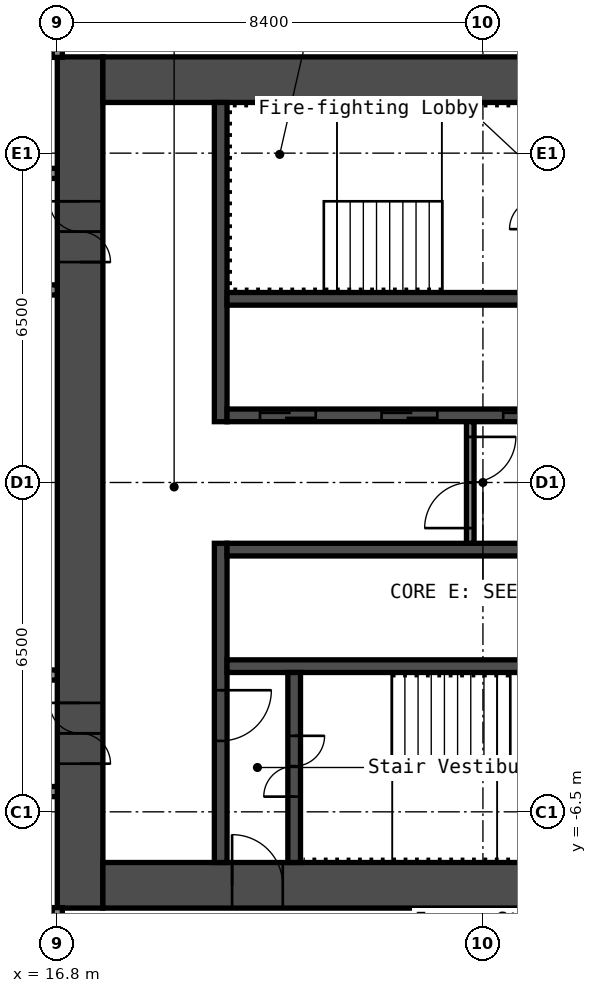
"""IFC4 building model, lengths in metres.
Left out: names, types, materials, properties, quantities, classifications, styles, units other than length and angle.
Written with IfcOpenShell. Run it as: python <this file> out.ifc"""

import sys

from ifc_helpers import new_model, si_unit, direction, frame, frame_2d, origin, place, context, subcontext, project, spatial, rectangle, extrude, element, fill, save


model = new_model("IFC4")
c1 = context("Model", 3, precision=1e-05, world=origin(), true_north=direction((0.0, 1.0)))
c2 = subcontext(c1, "Body", "Model", "MODEL_VIEW")
j1 = project(units=[si_unit("LENGTHUNIT", "METRE"), si_unit("PLANEANGLEUNIT", "RADIAN")], contexts=[c1])
p1 = place(None, origin())
s1 = spatial("IfcSite", under=j1, at=p1, CompositionType="ELEMENT")
p2 = place(p1, origin())
s2 = spatial("IfcBuilding", under=s1, at=p2, CompositionType="ELEMENT")
p3 = place(p2, frame((0.0, 0.0, 42.2)))
s3 = spatial("IfcBuildingStorey", under=s2, at=p3, CompositionType="ELEMENT", Elevation=42.2)
p4 = place(p3, frame((17.25, -8.4, 0.0), z_axis=(0.0, 0.0, 1.0), x_axis=(0.0, 1.0, 0.0)))
e1 = element("IfcWall", 1, at=p4, inside=s3, PredefinedType="SHEAR", context=c2, shape_type="SweptSolid", body=[
    extrude(rectangle(XDim=16.8, YDim=0.9, at=frame_2d((8.4, 0.0))), origin(), (0.0, 0.0, 1.0), 2.8),
])
p5 = place(p4, frame((12.75, 0.0, 0.0)))
e2 = element("IfcOpeningElement", 2, at=p5, cuts=e1, PredefinedType="OPENING", context=c2, shape_type="SweptSolid", body=[
    extrude(rectangle(XDim=1.2, YDim=2.1, at=frame_2d((0.6, 1.05))), frame((0.0, 0.46, 0.0), z_axis=(0.0, -1.0, 0.0), x_axis=(1.0, 0.0, 0.0)), (0.0, 0.0, 1.0), 0.92),
])
p6 = place(p4, frame((2.85, 0.0, 0.0)))
e3 = element("IfcOpeningElement", 3, at=p6, cuts=e1, PredefinedType="OPENING", context=c2, shape_type="SweptSolid", body=[
    extrude(rectangle(XDim=1.2, YDim=2.1, at=frame_2d((0.6, 1.05))), frame((0.0, 0.46, 0.0), z_axis=(0.0, -1.0, 0.0), x_axis=(1.0, 0.0, 0.0)), (0.0, 0.0, 1.0), 0.92),
])
p7 = place(p3, frame((17.7, 7.95, 0.0), z_axis=(0.0, 0.0, 1.0), x_axis=(1.0, 0.0, 0.0)))
e4 = element("IfcWall", 4, at=p7, inside=s3, PredefinedType="SHEAR", context=c2, shape_type="SweptSolid", body=[
    extrude(rectangle(XDim=15.0, YDim=0.9, at=frame_2d((7.5, 0.0))), origin(), (0.0, 0.0, 1.0), 2.8),
])
p8 = place(p7, frame((10.4, 0.0, 0.0)))
e5 = element("IfcOpeningElement", 5, at=p8, cuts=e4, PredefinedType="OPENING", context=c2, shape_type="SweptSolid", body=[
    extrude(rectangle(XDim=1.2, YDim=2.1, at=frame_2d((0.6, 1.05))), frame((0.0, 0.46, 0.0), z_axis=(0.0, -1.0, 0.0), x_axis=(1.0, 0.0, 0.0)), (0.0, 0.0, 1.0), 0.92),
])
p9 = place(p7, frame((13.35, 0.0, 0.0)))
e6 = element("IfcOpeningElement", 6, at=p9, cuts=e4, PredefinedType="OPENING", context=c2, shape_type="SweptSolid", body=[
    extrude(rectangle(XDim=0.9, YDim=2.1, at=frame_2d((0.45, 1.05))), frame((0.0, 0.46, 0.0), z_axis=(0.0, -1.0, 0.0), x_axis=(1.0, 0.0, 0.0)), (0.0, 0.0, 1.0), 0.92),
])
p10 = place(p3, frame((17.7, -7.95, 0.0), z_axis=(0.0, 0.0, 1.0), x_axis=(1.0, 0.0, 0.0)))
e7 = element("IfcWall", 7, at=p10, inside=s3, PredefinedType="SHEAR", context=c2, shape_type="SweptSolid", body=[
    extrude(rectangle(XDim=15.0, YDim=0.9, at=frame_2d((7.5, 0.0))), origin(), (0.0, 0.0, 1.0), 2.8),
])
p11 = place(p10, frame((2.55, 0.0, 0.0)))
e8 = element("IfcOpeningElement", 8, at=p11, cuts=e7, PredefinedType="OPENING", context=c2, shape_type="SweptSolid", body=[
    extrude(rectangle(XDim=1.0, YDim=2.1, at=frame_2d((0.5, 1.05))), frame((0.0, 0.46, 0.0), z_axis=(0.0, -1.0, 0.0), x_axis=(1.0, 0.0, 0.0)), (0.0, 0.0, 1.0), 0.92),
])
p12 = place(p3, frame((20.025, 1.2, 0.0), z_axis=(0.0, 0.0, 1.0), x_axis=(0.0, 1.0, 0.0)))
e9 = element("IfcWall", 9, at=p12, inside=s3, PredefinedType="SHEAR", context=c2, shape_type="SweptSolid", body=[
    extrude(rectangle(XDim=6.3, YDim=0.25, at=frame_2d((3.15, 0.0))), origin(), (0.0, 0.0, 1.0), 2.8),
])
p13 = place(p3, frame((20.025, -7.5, 0.0), z_axis=(0.0, 0.0, 1.0), x_axis=(0.0, 1.0, 0.0)))
e10 = element("IfcWall", 10, at=p13, inside=s3, PredefinedType="SHEAR", context=c2, shape_type="SweptSolid", body=[
    extrude(rectangle(XDim=6.3, YDim=0.25, at=frame_2d((3.15, 0.0))), origin(), (0.0, 0.0, 1.0), 2.8),
])
p14 = place(p13, frame((2.4, 0.0, 0.0)))
e11 = element("IfcOpeningElement", 11, at=p14, cuts=e10, PredefinedType="OPENING", context=c2, shape_type="SweptSolid", body=[
    extrude(rectangle(XDim=1.0, YDim=2.1, at=frame_2d((0.5, 1.05))), frame((0.0, 0.135, 0.0), z_axis=(0.0, -1.0, 0.0), x_axis=(1.0, 0.0, 0.0)), (0.0, 0.0, 1.0), 0.27),
])
p15 = place(p3, frame((20.15, 1.325, 0.0), z_axis=(0.0, 0.0, 1.0), x_axis=(1.0, 0.0, 0.0)))
e12 = element("IfcWall", 12, at=p15, inside=s3, PredefinedType="SHEAR", context=c2, shape_type="SweptSolid", body=[
    extrude(rectangle(XDim=7.5, YDim=0.25, at=frame_2d((3.75, 0.0))), origin(), (0.0, 0.0, 1.0), 2.8),
])
p16 = place(p15, frame((0.65, 0.0, 0.0)))
e13 = element("IfcOpeningElement", 13, at=p16, cuts=e12, PredefinedType="OPENING", context=c2, shape_type="SweptSolid", body=[
    extrude(rectangle(XDim=1.1, YDim=2.1, at=frame_2d((0.55, 1.05))), frame((0.0, 0.135, 0.0), z_axis=(0.0, -1.0, 0.0), x_axis=(1.0, 0.0, 0.0)), (0.0, 0.0, 1.0), 0.27),
])
p17 = place(p15, frame((3.05, 0.0, 0.0)))
e14 = element("IfcOpeningElement", 14, at=p17, cuts=e12, PredefinedType="OPENING", context=c2, shape_type="SweptSolid", body=[
    extrude(rectangle(XDim=1.1, YDim=2.1, at=frame_2d((0.55, 1.05))), frame((0.0, 0.135, 0.0), z_axis=(0.0, -1.0, 0.0), x_axis=(1.0, 0.0, 0.0)), (0.0, 0.0, 1.0), 0.27),
])
p18 = place(p15, frame((5.45, 0.0, 0.0)))
e15 = element("IfcOpeningElement", 15, at=p18, cuts=e12, PredefinedType="OPENING", context=c2, shape_type="SweptSolid", body=[
    extrude(rectangle(XDim=1.1, YDim=2.1, at=frame_2d((0.55, 1.05))), frame((0.0, 0.135, 0.0), z_axis=(0.0, -1.0, 0.0), x_axis=(1.0, 0.0, 0.0)), (0.0, 0.0, 1.0), 0.27),
])
for number, where, z_axis, x_axis in (
    (16, (20.15, 3.625, 0.0), (0.0, 0.0, 1.0), (1.0, 0.0, 0.0)),
    (17, (20.15, -1.325, 0.0), (0.0, 0.0, 1.0), (1.0, 0.0, 0.0)),
    (18, (20.15, -3.625, 0.0), (0.0, 0.0, 1.0), (1.0, 0.0, 0.0)),
):
    element("IfcWall", number, at=place(p3, frame(where, z_axis=z_axis, x_axis=x_axis)), inside=s3, PredefinedType="SHEAR", context=c2, shape_type="SweptSolid", body=[
        extrude(rectangle(XDim=7.5, YDim=0.25, at=frame_2d((3.75, 0.0))), origin(), (0.0, 0.0, 1.0), 2.8),
    ])
p19 = place(p3, frame((21.475, -7.5, 0.0), z_axis=(0.0, 0.0, 1.0), x_axis=(0.0, 1.0, 0.0)))
e19 = element("IfcWall", 19, at=p19, inside=s3, PredefinedType="SHEAR", context=c2, shape_type="SweptSolid", body=[
    extrude(rectangle(XDim=3.75, YDim=0.25, at=frame_2d((1.875, 0.0))), origin(), (0.0, 0.0, 1.0), 2.8),
])
p20 = place(p19, frame((1.3, 0.0, 0.0)))
e20 = element("IfcOpeningElement", 20, at=p20, cuts=e19, PredefinedType="OPENING", context=c2, shape_type="SweptSolid", body=[
    extrude(rectangle(XDim=1.2, YDim=2.1, at=frame_2d((0.6, 1.05))), frame((0.0, 0.135, 0.0), z_axis=(0.0, -1.0, 0.0), x_axis=(1.0, 0.0, 0.0)), (0.0, 0.0, 1.0), 0.27),
])
p21 = place(p3, frame((24.95, -1.2, 0.0), z_axis=(0.0, 0.0, 1.0), x_axis=(0.0, 1.0, 0.0)))
e21 = element("IfcWall", 21, at=p21, inside=s3, PredefinedType="PARTITIONING", context=c2, shape_type="SweptSolid", body=[
    extrude(rectangle(XDim=2.4, YDim=0.15, at=frame_2d((1.2, 0.0))), origin(), (0.0, 0.0, 1.0), 2.8),
])
p22 = place(p21, frame((0.3, 0.0, 0.0)))
e22 = element("IfcOpeningElement", 22, at=p22, cuts=e21, PredefinedType="OPENING", context=c2, shape_type="SweptSolid", body=[
    extrude(rectangle(XDim=1.8, YDim=2.1, at=frame_2d((0.9, 1.05))), frame((0.0, 0.085, 0.0), z_axis=(0.0, -1.0, 0.0), x_axis=(1.0, 0.0, 0.0)), (0.0, 0.0, 1.0), 0.17),
])
p23 = place(p3, frame((-16.8, -6.1, 0.0), z_axis=(0.0, 0.0, 1.0), x_axis=(1.0, 0.0, 0.0)))
e23 = element("IfcWall", 23, at=p23, inside=s3, PredefinedType="PARTITIONING", context=c2, shape_type="SweptSolid", body=[
    extrude(rectangle(XDim=33.6, YDim=0.2, at=frame_2d((16.8, 0.0))), origin(), (0.0, 0.0, 1.0), 2.8),
])
p24 = place(p23, frame((5.4, 0.0, 0.0)))
e24 = element("IfcOpeningElement", 24, at=p24, cuts=e23, PredefinedType="OPENING", context=c2, shape_type="SweptSolid", body=[
    extrude(rectangle(XDim=1.0, YDim=2.1, at=frame_2d((0.5, 1.05))), frame((0.0, 0.11, 0.0), z_axis=(0.0, -1.0, 0.0), x_axis=(1.0, 0.0, 0.0)), (0.0, 0.0, 1.0), 0.22),
])
p25 = place(p23, frame((11.25, 0.0, 0.0)))
e25 = element("IfcOpeningElement", 25, at=p25, cuts=e23, PredefinedType="OPENING", context=c2, shape_type="SweptSolid", body=[
    extrude(rectangle(XDim=1.0, YDim=2.1, at=frame_2d((0.5, 1.05))), frame((0.0, 0.11, 0.0), z_axis=(0.0, -1.0, 0.0), x_axis=(1.0, 0.0, 0.0)), (0.0, 0.0, 1.0), 0.22),
])
p26 = place(p23, frame((12.95, 0.0, 0.0)))
e26 = element("IfcOpeningElement", 26, at=p26, cuts=e23, PredefinedType="OPENING", context=c2, shape_type="SweptSolid", body=[
    extrude(rectangle(XDim=1.0, YDim=2.1, at=frame_2d((0.5, 1.05))), frame((0.0, 0.11, 0.0), z_axis=(0.0, -1.0, 0.0), x_axis=(1.0, 0.0, 0.0)), (0.0, 0.0, 1.0), 0.22),
])
p27 = place(p23, frame((18.115, 0.0, 0.0)))
e27 = element("IfcOpeningElement", 27, at=p27, cuts=e23, PredefinedType="OPENING", context=c2, shape_type="SweptSolid", body=[
    extrude(rectangle(XDim=0.9, YDim=2.1, at=frame_2d((0.45, 1.05))), frame((0.0, 0.11, 0.0), z_axis=(0.0, -1.0, 0.0), x_axis=(1.0, 0.0, 0.0)), (0.0, 0.0, 1.0), 0.22),
])
p28 = place(p23, frame((22.315, 0.0, 0.0)))
e28 = element("IfcOpeningElement", 28, at=p28, cuts=e23, PredefinedType="OPENING", context=c2, shape_type="SweptSolid", body=[
    extrude(rectangle(XDim=0.9, YDim=2.1, at=frame_2d((0.45, 1.05))), frame((0.0, 0.11, 0.0), z_axis=(0.0, -1.0, 0.0), x_axis=(1.0, 0.0, 0.0)), (0.0, 0.0, 1.0), 0.22),
])
p29 = place(p23, frame((28.05, 0.0, 0.0)))
e29 = element("IfcOpeningElement", 29, at=p29, cuts=e23, PredefinedType="OPENING", context=c2, shape_type="SweptSolid", body=[
    extrude(rectangle(XDim=1.0, YDim=2.1, at=frame_2d((0.5, 1.05))), frame((0.0, 0.11, 0.0), z_axis=(0.0, -1.0, 0.0), x_axis=(1.0, 0.0, 0.0)), (0.0, 0.0, 1.0), 0.22),
])
p30 = place(p23, frame((29.75, 0.0, 0.0)))
e30 = element("IfcOpeningElement", 30, at=p30, cuts=e23, PredefinedType="OPENING", context=c2, shape_type="SweptSolid", body=[
    extrude(rectangle(XDim=1.0, YDim=2.1, at=frame_2d((0.5, 1.05))), frame((0.0, 0.11, 0.0), z_axis=(0.0, -1.0, 0.0), x_axis=(1.0, 0.0, 0.0)), (0.0, 0.0, 1.0), 0.22),
])
p31 = place(p3, frame((-16.8, -3.8, 0.0), z_axis=(0.0, 0.0, 1.0), x_axis=(1.0, 0.0, 0.0)))
e31 = element("IfcWall", 31, at=p31, inside=s3, PredefinedType="PARTITIONING", context=c2, shape_type="SweptSolid", body=[
    extrude(rectangle(XDim=33.6, YDim=0.2, at=frame_2d((16.8, 0.0))), origin(), (0.0, 0.0, 1.0), 2.8),
])
p32 = place(p31, frame((9.46, 0.0, 0.0)))
e32 = element("IfcOpeningElement", 32, at=p32, cuts=e31, PredefinedType="OPENING", context=c2, shape_type="SweptSolid", body=[
    extrude(rectangle(XDim=0.9, YDim=2.1, at=frame_2d((0.45, 1.05))), frame((0.0, 0.11, 0.0), z_axis=(0.0, -1.0, 0.0), x_axis=(1.0, 0.0, 0.0)), (0.0, 0.0, 1.0), 0.22),
])
p33 = place(p31, frame((13.66, 0.0, 0.0)))
e33 = element("IfcOpeningElement", 33, at=p33, cuts=e31, PredefinedType="OPENING", context=c2, shape_type="SweptSolid", body=[
    extrude(rectangle(XDim=0.9, YDim=2.1, at=frame_2d((0.45, 1.05))), frame((0.0, 0.11, 0.0), z_axis=(0.0, -1.0, 0.0), x_axis=(1.0, 0.0, 0.0)), (0.0, 0.0, 1.0), 0.22),
])
p34 = place(p31, frame((26.6, 0.0, 0.0)))
e34 = element("IfcOpeningElement", 34, at=p34, cuts=e31, PredefinedType="OPENING", context=c2, shape_type="SweptSolid", body=[
    extrude(rectangle(XDim=0.9, YDim=2.1, at=frame_2d((0.45, 1.05))), frame((0.0, 0.11, 0.0), z_axis=(0.0, -1.0, 0.0), x_axis=(1.0, 0.0, 0.0)), (0.0, 0.0, 1.0), 0.22),
])
p35 = place(p31, frame((30.8, 0.0, 0.0)))
e35 = element("IfcOpeningElement", 35, at=p35, cuts=e31, PredefinedType="OPENING", context=c2, shape_type="SweptSolid", body=[
    extrude(rectangle(XDim=0.9, YDim=2.1, at=frame_2d((0.45, 1.05))), frame((0.0, 0.11, 0.0), z_axis=(0.0, -1.0, 0.0), x_axis=(1.0, 0.0, 0.0)), (0.0, 0.0, 1.0), 0.22),
])
p36 = place(p3, frame((-16.8, 3.8, 0.0), z_axis=(0.0, 0.0, 1.0), x_axis=(1.0, 0.0, 0.0)))
e36 = element("IfcWall", 36, at=p36, inside=s3, PredefinedType="PARTITIONING", context=c2, shape_type="SweptSolid", body=[
    extrude(rectangle(XDim=33.6, YDim=0.2, at=frame_2d((16.8, 0.0))), origin(), (0.0, 0.0, 1.0), 2.8),
])
p37 = place(p36, frame((2.24, 0.0, 0.0)))
e37 = element("IfcOpeningElement", 37, at=p37, cuts=e36, PredefinedType="OPENING", context=c2, shape_type="SweptSolid", body=[
    extrude(rectangle(XDim=0.9, YDim=2.1, at=frame_2d((0.45, 1.05))), frame((0.0, 0.11, 0.0), z_axis=(0.0, -1.0, 0.0), x_axis=(1.0, 0.0, 0.0)), (0.0, 0.0, 1.0), 0.22),
])
p38 = place(p36, frame((6.44, 0.0, 0.0)))
e38 = element("IfcOpeningElement", 38, at=p38, cuts=e36, PredefinedType="OPENING", context=c2, shape_type="SweptSolid", body=[
    extrude(rectangle(XDim=0.9, YDim=2.1, at=frame_2d((0.45, 1.05))), frame((0.0, 0.11, 0.0), z_axis=(0.0, -1.0, 0.0), x_axis=(1.0, 0.0, 0.0)), (0.0, 0.0, 1.0), 0.22),
])
p39 = place(p36, frame((17.945, 0.0, 0.0)))
e39 = element("IfcOpeningElement", 39, at=p39, cuts=e36, PredefinedType="OPENING", context=c2, shape_type="SweptSolid", body=[
    extrude(rectangle(XDim=0.9, YDim=2.1, at=frame_2d((0.45, 1.05))), frame((0.0, 0.11, 0.0), z_axis=(0.0, -1.0, 0.0), x_axis=(1.0, 0.0, 0.0)), (0.0, 0.0, 1.0), 0.22),
])
p40 = place(p36, frame((22.145, 0.0, 0.0)))
e40 = element("IfcOpeningElement", 40, at=p40, cuts=e36, PredefinedType="OPENING", context=c2, shape_type="SweptSolid", body=[
    extrude(rectangle(XDim=0.9, YDim=2.1, at=frame_2d((0.45, 1.05))), frame((0.0, 0.11, 0.0), z_axis=(0.0, -1.0, 0.0), x_axis=(1.0, 0.0, 0.0)), (0.0, 0.0, 1.0), 0.22),
])
p41 = place(p3, frame((-16.8, 6.1, 0.0), z_axis=(0.0, 0.0, 1.0), x_axis=(1.0, 0.0, 0.0)))
e41 = element("IfcWall", 41, at=p41, inside=s3, PredefinedType="PARTITIONING", context=c2, shape_type="SweptSolid", body=[
    extrude(rectangle(XDim=33.6, YDim=0.2, at=frame_2d((16.8, 0.0))), origin(), (0.0, 0.0, 1.0), 2.8),
])
p42 = place(p41, frame((5.4, 0.0, 0.0)))
e42 = element("IfcOpeningElement", 42, at=p42, cuts=e41, PredefinedType="OPENING", context=c2, shape_type="SweptSolid", body=[
    extrude(rectangle(XDim=1.0, YDim=2.1, at=frame_2d((0.5, 1.05))), frame((0.0, 0.11, 0.0), z_axis=(0.0, -1.0, 0.0), x_axis=(1.0, 0.0, 0.0)), (0.0, 0.0, 1.0), 0.22),
])
p43 = place(p41, frame((11.25, 0.0, 0.0)))
e43 = element("IfcOpeningElement", 43, at=p43, cuts=e41, PredefinedType="OPENING", context=c2, shape_type="SweptSolid", body=[
    extrude(rectangle(XDim=1.0, YDim=2.1, at=frame_2d((0.5, 1.05))), frame((0.0, 0.11, 0.0), z_axis=(0.0, -1.0, 0.0), x_axis=(1.0, 0.0, 0.0)), (0.0, 0.0, 1.0), 0.22),
])
p44 = place(p41, frame((12.95, 0.0, 0.0)))
e44 = element("IfcOpeningElement", 44, at=p44, cuts=e41, PredefinedType="OPENING", context=c2, shape_type="SweptSolid", body=[
    extrude(rectangle(XDim=1.0, YDim=2.1, at=frame_2d((0.5, 1.05))), frame((0.0, 0.11, 0.0), z_axis=(0.0, -1.0, 0.0), x_axis=(1.0, 0.0, 0.0)), (0.0, 0.0, 1.0), 0.22),
])
p45 = place(p41, frame((18.28, 0.0, 0.0)))
e45 = element("IfcOpeningElement", 45, at=p45, cuts=e41, PredefinedType="OPENING", context=c2, shape_type="SweptSolid", body=[
    extrude(rectangle(XDim=0.9, YDim=2.1, at=frame_2d((0.45, 1.05))), frame((0.0, 0.11, 0.0), z_axis=(0.0, -1.0, 0.0), x_axis=(1.0, 0.0, 0.0)), (0.0, 0.0, 1.0), 0.22),
])
p46 = place(p41, frame((22.48, 0.0, 0.0)))
e46 = element("IfcOpeningElement", 46, at=p46, cuts=e41, PredefinedType="OPENING", context=c2, shape_type="SweptSolid", body=[
    extrude(rectangle(XDim=0.9, YDim=2.1, at=frame_2d((0.45, 1.05))), frame((0.0, 0.11, 0.0), z_axis=(0.0, -1.0, 0.0), x_axis=(1.0, 0.0, 0.0)), (0.0, 0.0, 1.0), 0.22),
])
p47 = place(p41, frame((28.05, 0.0, 0.0)))
e47 = element("IfcOpeningElement", 47, at=p47, cuts=e41, PredefinedType="OPENING", context=c2, shape_type="SweptSolid", body=[
    extrude(rectangle(XDim=1.0, YDim=2.1, at=frame_2d((0.5, 1.05))), frame((0.0, 0.11, 0.0), z_axis=(0.0, -1.0, 0.0), x_axis=(1.0, 0.0, 0.0)), (0.0, 0.0, 1.0), 0.22),
])
p48 = place(p41, frame((29.75, 0.0, 0.0)))
e48 = element("IfcOpeningElement", 48, at=p48, cuts=e41, PredefinedType="OPENING", context=c2, shape_type="SweptSolid", body=[
    extrude(rectangle(XDim=1.0, YDim=2.1, at=frame_2d((0.5, 1.05))), frame((0.0, 0.11, 0.0), z_axis=(0.0, -1.0, 0.0), x_axis=(1.0, 0.0, 0.0)), (0.0, 0.0, 1.0), 0.22),
])
for number, where, z_axis, x_axis in (
    (49, (16.8, -20.3, 0.0), (0.0, 0.0, 1.0), (0.0, 1.0, 0.0)),
    (50, (16.8, 8.39, 0.0), (0.0, 0.0, 1.0), (0.0, 1.0, 0.0)),
):
    element("IfcWall", number, at=place(p3, frame(where, z_axis=z_axis, x_axis=x_axis)), inside=s3, PredefinedType="PARTITIONING", context=c2, shape_type="SweptSolid", body=[
        extrude(rectangle(XDim=11.91, YDim=0.2, at=frame_2d((5.955, 0.0))), origin(), (0.0, 0.0, 1.0), 2.8),
    ])
p49 = place(p5, origin())
e51 = element("IfcDoor", 51, at=p49, inside=s3, OperationType="DOUBLE_DOOR_SINGLE_SWING", PredefinedType="DOOR", context=c2, shape_type="SweptSolid", body=[
    extrude(rectangle(XDim=1.2, YDim=2.1, at=frame_2d((0.6, 1.05))), frame((0.0, 0.025, 0.0), z_axis=(0.0, -1.0, 0.0), x_axis=(1.0, 0.0, 0.0)), (0.0, 0.0, 1.0), 0.05),
])
fill(e2, e51)
p50 = place(p6, origin())
e52 = element("IfcDoor", 52, at=p50, inside=s3, OperationType="DOUBLE_DOOR_SINGLE_SWING", PredefinedType="DOOR", context=c2, shape_type="SweptSolid", body=[
    extrude(rectangle(XDim=1.2, YDim=2.1, at=frame_2d((0.6, 1.05))), frame((0.0, 0.025, 0.0), z_axis=(0.0, -1.0, 0.0), x_axis=(1.0, 0.0, 0.0)), (0.0, 0.0, 1.0), 0.05),
])
fill(e3, e52)
p51 = place(p11, origin())
e53 = element("IfcDoor", 53, at=p51, inside=s3, OperationType="SINGLE_SWING_RIGHT", PredefinedType="DOOR", context=c2, shape_type="SweptSolid", body=[
    extrude(rectangle(XDim=1.0, YDim=2.1, at=frame_2d((0.5, 1.05))), frame((0.0, 0.025, 0.0), z_axis=(0.0, -1.0, 0.0), x_axis=(1.0, 0.0, 0.0)), (0.0, 0.0, 1.0), 0.05),
])
fill(e8, e53)
p52 = place(p20, origin())
e54 = element("IfcDoor", 54, at=p52, inside=s3, OperationType="DOUBLE_DOOR_SINGLE_SWING", PredefinedType="DOOR", context=c2, shape_type="SweptSolid", body=[
    extrude(rectangle(XDim=1.2, YDim=2.1, at=frame_2d((0.6, 1.05))), frame((0.0, 0.025, 0.0), z_axis=(0.0, -1.0, 0.0), x_axis=(1.0, 0.0, 0.0)), (0.0, 0.0, 1.0), 0.05),
])
fill(e20, e54)
p53 = place(p14, origin())
e55 = element("IfcDoor", 55, at=p53, inside=s3, OperationType="SINGLE_SWING_RIGHT", PredefinedType="DOOR", context=c2, shape_type="SweptSolid", body=[
    extrude(rectangle(XDim=1.0, YDim=2.1, at=frame_2d((0.5, 1.05))), frame((0.0, 0.025, 0.0), z_axis=(0.0, -1.0, 0.0), x_axis=(1.0, 0.0, 0.0)), (0.0, 0.0, 1.0), 0.05),
])
fill(e11, e55)
p54 = place(p22, origin())
e56 = element("IfcDoor", 56, at=p54, inside=s3, OperationType="DOUBLE_DOOR_SINGLE_SWING", PredefinedType="DOOR", context=c2, shape_type="SweptSolid", body=[
    extrude(rectangle(XDim=1.8, YDim=2.1, at=frame_2d((0.9, 1.05))), frame((0.0, 0.025, 0.0), z_axis=(0.0, -1.0, 0.0), x_axis=(1.0, 0.0, 0.0)), (0.0, 0.0, 1.0), 0.05),
])
fill(e22, e56)
p55 = place(p16, origin())
e57 = element("IfcDoor", 57, at=p55, inside=s3, OperationType="DOUBLE_DOOR_SLIDING", PredefinedType="DOOR", context=c2, shape_type="SweptSolid", body=[
    extrude(rectangle(XDim=1.1, YDim=2.1, at=frame_2d((0.55, 1.05))), frame((0.0, 0.025, 0.0), z_axis=(0.0, -1.0, 0.0), x_axis=(1.0, 0.0, 0.0)), (0.0, 0.0, 1.0), 0.05),
])
fill(e13, e57)
p56 = place(p17, origin())
e58 = element("IfcDoor", 58, at=p56, inside=s3, OperationType="DOUBLE_DOOR_SLIDING", PredefinedType="DOOR", context=c2, shape_type="SweptSolid", body=[
    extrude(rectangle(XDim=1.1, YDim=2.1, at=frame_2d((0.55, 1.05))), frame((0.0, 0.025, 0.0), z_axis=(0.0, -1.0, 0.0), x_axis=(1.0, 0.0, 0.0)), (0.0, 0.0, 1.0), 0.05),
])
fill(e14, e58)
p57 = place(p18, origin())
e59 = element("IfcDoor", 59, at=p57, inside=s3, OperationType="DOUBLE_DOOR_SLIDING", PredefinedType="DOOR", context=c2, shape_type="SweptSolid", body=[
    extrude(rectangle(XDim=1.1, YDim=2.1, at=frame_2d((0.55, 1.05))), frame((0.0, 0.025, 0.0), z_axis=(0.0, -1.0, 0.0), x_axis=(1.0, 0.0, 0.0)), (0.0, 0.0, 1.0), 0.05),
])
fill(e15, e59)
save(model, sys.argv[1])
